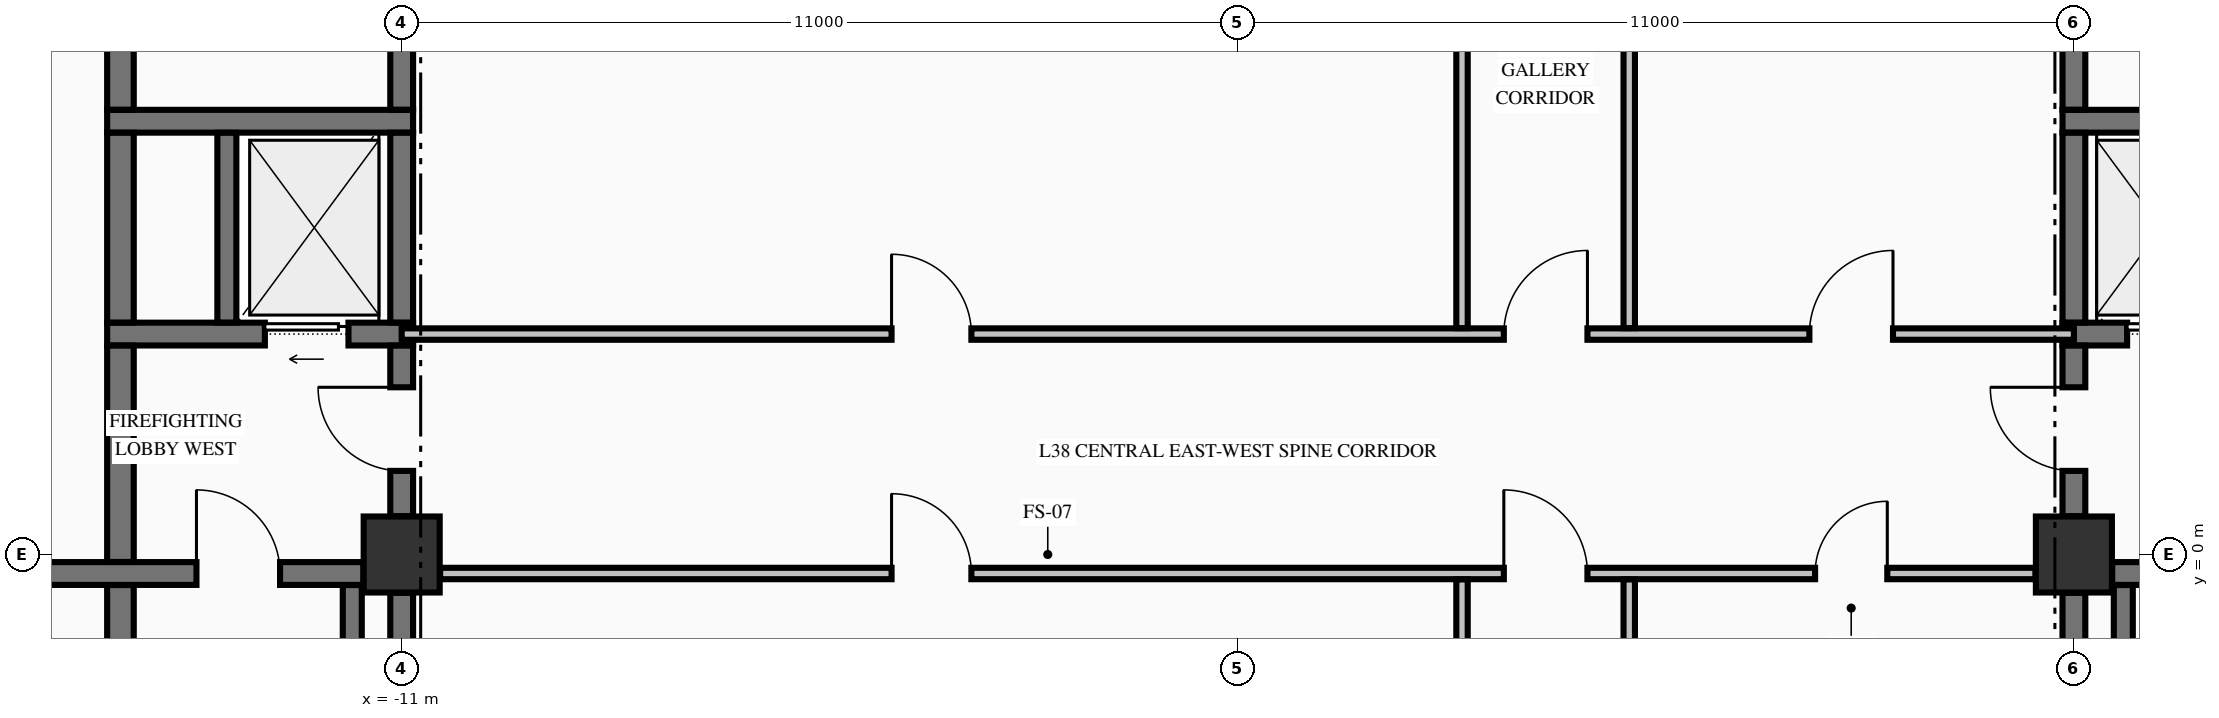
"""IFC4 building model, lengths in metres.
Left out: names, types, materials, properties, quantities, classifications, styles, units other than length and angle.
Written with IfcOpenShell. Run it as: python <this file> out.ifc"""

import sys

from ifc_helpers import new_model, si_unit, direction, frame, frame_2d, origin, origin_2d, place, context, subcontext, project, spatial, rectangle, extrude, element, fill, save


model = new_model("IFC4")
c1 = context("Model", 3, precision=1e-05, world=origin(), true_north=direction((0.0, 1.0)))
c2 = subcontext(c1, "Body", "Model", "MODEL_VIEW")
j1 = project(units=[si_unit("LENGTHUNIT", "METRE"), si_unit("PLANEANGLEUNIT", "RADIAN")], contexts=[c1])
p1 = place(None, origin())
s1 = spatial("IfcSite", under=j1, at=p1, CompositionType="ELEMENT")
p2 = place(p1, origin())
s2 = spatial("IfcBuilding", under=s1, at=p2, CompositionType="ELEMENT")
p3 = place(p2, frame((0.0, 0.0, 149.91)))
s3 = spatial("IfcBuildingStorey", under=s2, at=p3, CompositionType="ELEMENT", Elevation=149.91)
for number, where, z_axis, x_axis in (
    (1, (-11.0, 0.0, -0.25), (0.0, 0.0, 1.0), (1.0, 0.0, 0.0)),
    (2, (11.0, 0.0, -0.25), (0.0, 0.0, 1.0), (1.0, 0.0, 0.0)),
):
    element("IfcColumn", number, at=place(p3, frame(where, z_axis=z_axis, x_axis=x_axis)), inside=s3, PredefinedType="COLUMN", context=c2, shape_type="SweptSolid", body=[
        extrude(rectangle(XDim=1.0, YDim=1.0, at=origin_2d()), origin(), (0.0, 0.0, 1.0), 3.395),
    ])
p4 = place(p3, frame((-19.496, -0.25, 0.0), z_axis=(0.0, 0.0, 1.0), x_axis=(1.0, 0.0, 0.0)))
e3 = element("IfcWall", 3, at=p4, inside=s3, PredefinedType="SHEAR", context=c2, shape_type="SweptSolid", body=[
    extrude(rectangle(XDim=7.992, YDim=0.3, at=frame_2d((3.996, 0.0))), origin(), (0.0, 0.0, 1.0), 3.145),
])
p5 = place(p4, frame((5.796, 0.0, 0.0)))
e4 = element("IfcOpeningElement", 4, at=p5, cuts=e3, PredefinedType="OPENING", context=c2, shape_type="SweptSolid", body=[
    extrude(rectangle(XDim=1.1, YDim=2.15, at=frame_2d((0.55, 1.075))), frame((0.0, 0.16, 0.0), z_axis=(0.0, -1.0, 0.0), x_axis=(1.0, 0.0, 0.0)), (0.0, 0.0, 1.0), 0.32),
])
p6 = place(p3, frame((11.504, -0.25, 0.0), z_axis=(0.0, 0.0, 1.0), x_axis=(1.0, 0.0, 0.0)))
e5 = element("IfcWall", 5, at=p6, inside=s3, PredefinedType="SHEAR", context=c2, shape_type="SweptSolid", body=[
    extrude(rectangle(XDim=3.371, YDim=0.3, at=frame_2d((1.686, 0.0))), origin(), (0.0, 0.0, 1.0), 3.145),
])
p7 = place(p6, frame((1.096, 0.0, 0.0)))
e6 = element("IfcOpeningElement", 6, at=p7, cuts=e5, PredefinedType="OPENING", context=c2, shape_type="SweptSolid", body=[
    extrude(rectangle(XDim=1.1, YDim=2.15, at=frame_2d((0.55, 1.075))), frame((0.0, 0.16, 0.0), z_axis=(0.0, -1.0, 0.0), x_axis=(1.0, 0.0, 0.0)), (0.0, 0.0, 1.0), 0.32),
])
p8 = place(p3, frame((-14.875, 2.9, 0.0), z_axis=(0.0, 0.0, 1.0), x_axis=(1.0, 0.0, 0.0)))
e7 = element("IfcWall", 7, at=p8, inside=s3, PredefinedType="SHEAR", context=c2, shape_type="SweptSolid", body=[
    extrude(rectangle(XDim=4.025, YDim=0.3, at=frame_2d((2.012, 0.0))), origin(), (0.0, 0.0, 1.0), 3.145),
])
p9 = place(p8, frame((2.075, 0.0, 0.0)))
e8 = element("IfcOpeningElement", 8, at=p9, cuts=e7, PredefinedType="OPENING", context=c2, shape_type="SweptSolid", body=[
    extrude(rectangle(XDim=1.1, YDim=2.2, at=frame_2d((0.55, 1.1))), frame((0.0, 0.16, 0.0), z_axis=(0.0, -1.0, 0.0), x_axis=(1.0, 0.0, 0.0)), (0.0, 0.0, 1.0), 0.32),
])
p10 = place(p3, frame((10.85, 2.9, 0.0), z_axis=(0.0, 0.0, 1.0), x_axis=(1.0, 0.0, 0.0)))
e9 = element("IfcWall", 9, at=p10, inside=s3, PredefinedType="SHEAR", context=c2, shape_type="SweptSolid", body=[
    extrude(rectangle(XDim=4.025, YDim=0.3, at=frame_2d((2.012, 0.0))), origin(), (0.0, 0.0, 1.0), 3.145),
])
p11 = place(p10, frame((0.85, 0.0, 0.0)))
e10 = element("IfcOpeningElement", 10, at=p11, cuts=e9, PredefinedType="OPENING", context=c2, shape_type="SweptSolid", body=[
    extrude(rectangle(XDim=1.1, YDim=2.2, at=frame_2d((0.55, 1.1))), frame((0.0, 0.16, 0.0), z_axis=(0.0, -1.0, 0.0), x_axis=(1.0, 0.0, 0.0)), (0.0, 0.0, 1.0), 0.32),
])
for number, where, z_axis, x_axis in (
    (11, (-14.875, 5.7, 0.0), (0.0, 0.0, 1.0), (1.0, 0.0, 0.0)),
    (12, (10.85, 5.7, 0.0), (0.0, 0.0, 1.0), (1.0, 0.0, 0.0)),
):
    element("IfcWall", number, at=place(p3, frame(where, z_axis=z_axis, x_axis=x_axis)), inside=s3, PredefinedType="SHEAR", context=c2, shape_type="SweptSolid", body=[
        extrude(rectangle(XDim=4.025, YDim=0.3, at=frame_2d((2.012, 0.0))), origin(), (0.0, 0.0, 1.0), 3.145),
    ])
p12 = place(p3, frame((-10.494, -0.25, 0.0), z_axis=(0.0, 0.0, 1.0), x_axis=(1.0, 0.0, 0.0)))
e13 = element("IfcWall", 13, at=p12, inside=s3, PredefinedType="PARTITIONING", context=c2, shape_type="SweptSolid", body=[
    extrude(rectangle(XDim=20.988, YDim=0.15, at=frame_2d((10.494, 0.0))), origin(), (0.0, 0.0, 1.0), 3.145),
])
p13 = place(p12, frame((13.994, 0.0, 0.0)))
e14 = element("IfcOpeningElement", 14, at=p13, cuts=e13, PredefinedType="OPENING", context=c2, shape_type="SweptSolid", body=[
    extrude(rectangle(XDim=1.1, YDim=2.15, at=frame_2d((0.55, 1.075))), frame((0.0, 0.085, 0.0), z_axis=(0.0, -1.0, 0.0), x_axis=(1.0, 0.0, 0.0)), (0.0, 0.0, 1.0), 0.17),
])
p14 = place(p12, frame((5.939, 0.0, 0.0)))
e15 = element("IfcOpeningElement", 15, at=p14, cuts=e13, PredefinedType="OPENING", context=c2, shape_type="SweptSolid", body=[
    extrude(rectangle(XDim=1.05, YDim=2.15, at=frame_2d((0.525, 1.075))), frame((0.0, 0.085, 0.0), z_axis=(0.0, -1.0, 0.0), x_axis=(1.0, 0.0, 0.0)), (0.0, 0.0, 1.0), 0.17),
])
p15 = place(p12, frame((18.089, 0.0, 0.0)))
e16 = element("IfcOpeningElement", 16, at=p15, cuts=e13, PredefinedType="OPENING", context=c2, shape_type="SweptSolid", body=[
    extrude(rectangle(XDim=0.95, YDim=2.15, at=frame_2d((0.475, 1.075))), frame((0.0, 0.085, 0.0), z_axis=(0.0, -1.0, 0.0), x_axis=(1.0, 0.0, 0.0)), (0.0, 0.0, 1.0), 0.17),
])
p16 = place(p3, frame((-11.0, 2.9, 0.0), z_axis=(0.0, 0.0, 1.0), x_axis=(1.0, 0.0, 0.0)))
e17 = element("IfcWall", 17, at=p16, inside=s3, PredefinedType="PARTITIONING", context=c2, shape_type="SweptSolid", body=[
    extrude(rectangle(XDim=22.0, YDim=0.15, at=frame_2d((11.0, 0.0))), origin(), (0.0, 0.0, 1.0), 3.145),
])
p17 = place(p16, frame((14.5, 0.0, 0.0)))
e18 = element("IfcOpeningElement", 18, at=p17, cuts=e17, PredefinedType="OPENING", context=c2, shape_type="SweptSolid", body=[
    extrude(rectangle(XDim=1.1, YDim=2.15, at=frame_2d((0.55, 1.075))), frame((0.0, 0.085, 0.0), z_axis=(0.0, -1.0, 0.0), x_axis=(1.0, 0.0, 0.0)), (0.0, 0.0, 1.0), 0.17),
])
p18 = place(p16, frame((6.445, 0.0, 0.0)))
e19 = element("IfcOpeningElement", 19, at=p18, cuts=e17, PredefinedType="OPENING", context=c2, shape_type="SweptSolid", body=[
    extrude(rectangle(XDim=1.05, YDim=2.15, at=frame_2d((0.525, 1.075))), frame((0.0, 0.085, 0.0), z_axis=(0.0, -1.0, 0.0), x_axis=(1.0, 0.0, 0.0)), (0.0, 0.0, 1.0), 0.17),
])
p19 = place(p16, frame((18.52, 0.0, 0.0)))
e20 = element("IfcOpeningElement", 20, at=p19, cuts=e17, PredefinedType="OPENING", context=c2, shape_type="SweptSolid", body=[
    extrude(rectangle(XDim=1.1, YDim=2.15, at=frame_2d((0.55, 1.075))), frame((0.0, 0.085, 0.0), z_axis=(0.0, -1.0, 0.0), x_axis=(1.0, 0.0, 0.0)), (0.0, 0.0, 1.0), 0.17),
])
p20 = place(p3, frame((-14.7, -9.773, 0.0), z_axis=(0.0, 0.0, 1.0), x_axis=(0.0, 1.0, 0.0)))
e21 = element("IfcWall", 21, at=p20, inside=s3, PredefinedType="SHEAR", context=c2, shape_type="SweptSolid", body=[
    extrude(rectangle(XDim=9.371, YDim=0.35, at=frame_2d((4.686, 0.0))), origin(), (0.0, 0.0, 1.0), 3.145),
])
p21 = place(p3, frame((-14.7, -0.098, 0.0), z_axis=(0.0, 0.0, 1.0), x_axis=(0.0, 1.0, 0.0)))
e22 = element("IfcWall", 22, at=p21, inside=s3, PredefinedType="SHEAR", context=c2, shape_type="SweptSolid", body=[
    extrude(rectangle(XDim=2.846, YDim=0.35, at=frame_2d((1.423, 0.0))), origin(), (0.0, 0.0, 1.0), 3.145),
])
p22 = place(p3, frame((-14.7, 3.052, 0.0), z_axis=(0.0, 0.0, 1.0), x_axis=(0.0, 1.0, 0.0)))
e23 = element("IfcWall", 23, at=p22, inside=s3, PredefinedType="SHEAR", context=c2, shape_type="SweptSolid", body=[
    extrude(rectangle(XDim=2.496, YDim=0.35, at=frame_2d((1.248, 0.0))), origin(), (0.0, 0.0, 1.0), 3.145),
])
p23 = place(p3, frame((-14.7, 5.852, 0.0), z_axis=(0.0, 0.0, 1.0), x_axis=(0.0, 1.0, 0.0)))
e24 = element("IfcWall", 24, at=p23, inside=s3, PredefinedType="SHEAR", context=c2, shape_type="SweptSolid", body=[
    extrude(rectangle(XDim=4.471, YDim=0.35, at=frame_2d((2.235, 0.0))), origin(), (0.0, 0.0, 1.0), 3.145),
])
p24 = place(p3, frame((-13.3, 3.052, 0.0), z_axis=(0.0, 0.0, 1.0), x_axis=(0.0, 1.0, 0.0)))
e25 = element("IfcWall", 25, at=p24, inside=s3, PredefinedType="SOLIDWALL", context=c2, shape_type="SweptSolid", body=[
    extrude(rectangle(XDim=2.496, YDim=0.25, at=frame_2d((1.248, 0.0))), origin(), (0.0, 0.0, 1.0), 3.145),
])
p25 = place(p3, frame((-11.65, -9.798, 0.0), z_axis=(0.0, 0.0, 1.0), x_axis=(0.0, 1.0, 0.0)))
e26 = element("IfcWall", 26, at=p25, inside=s3, PredefinedType="SOLIDWALL", context=c2, shape_type="SweptSolid", body=[
    extrude(rectangle(XDim=9.396, YDim=0.25, at=frame_2d((4.698, 0.0))), origin(), (0.0, 0.0, 1.0), 3.145),
])
p26 = place(p3, frame((-11.0, -9.446, 0.0), z_axis=(0.0, 0.0, 1.0), x_axis=(0.0, 1.0, 0.0)))
e27 = element("IfcWall", 27, at=p26, inside=s3, PredefinedType="SHEAR", context=c2, shape_type="SweptSolid", body=[
    extrude(rectangle(XDim=8.942, YDim=0.3, at=frame_2d((4.471, 0.0))), origin(), (0.0, 0.0, 1.0), 3.145),
])
p27 = place(p3, frame((-11.0, 0.504, 0.0), z_axis=(0.0, 0.0, 1.0), x_axis=(0.0, 1.0, 0.0)))
e28 = element("IfcWall", 28, at=p27, inside=s3, PredefinedType="SHEAR", context=c2, shape_type="SweptSolid", body=[
    extrude(rectangle(XDim=2.244, YDim=0.3, at=frame_2d((1.122, 0.0))), origin(), (0.0, 0.0, 1.0), 3.145),
])
p28 = place(p27, frame((0.596, 0.0, 0.0)))
e29 = element("IfcOpeningElement", 29, at=p28, cuts=e28, PredefinedType="OPENING", context=c2, shape_type="SweptSolid", body=[
    extrude(rectangle(XDim=1.1, YDim=2.15, at=frame_2d((0.55, 1.075))), frame((0.0, 0.16, 0.0), z_axis=(0.0, -1.0, 0.0), x_axis=(1.0, 0.0, 0.0)), (0.0, 0.0, 1.0), 0.32),
])
p29 = place(p3, frame((-11.0, 3.052, 0.0), z_axis=(0.0, 0.0, 1.0), x_axis=(0.0, 1.0, 0.0)))
e30 = element("IfcWall", 30, at=p29, inside=s3, PredefinedType="SHEAR", context=c2, shape_type="SweptSolid", body=[
    extrude(rectangle(XDim=2.496, YDim=0.3, at=frame_2d((1.248, 0.0))), origin(), (0.0, 0.0, 1.0), 3.145),
])
p30 = place(p3, frame((-11.0, 5.852, 0.0), z_axis=(0.0, 0.0, 1.0), x_axis=(0.0, 1.0, 0.0)))
e31 = element("IfcWall", 31, at=p30, inside=s3, PredefinedType="SHEAR", context=c2, shape_type="SweptSolid", body=[
    extrude(rectangle(XDim=4.144, YDim=0.3, at=frame_2d((2.072, 0.0))), origin(), (0.0, 0.0, 1.0), 3.145),
])
p31 = place(p3, frame((11.0, -9.446, 0.0), z_axis=(0.0, 0.0, 1.0), x_axis=(0.0, 1.0, 0.0)))
e32 = element("IfcWall", 32, at=p31, inside=s3, PredefinedType="SHEAR", context=c2, shape_type="SweptSolid", body=[
    extrude(rectangle(XDim=8.942, YDim=0.3, at=frame_2d((4.471, 0.0))), origin(), (0.0, 0.0, 1.0), 3.145),
])
p32 = place(p3, frame((11.0, 0.504, 0.0), z_axis=(0.0, 0.0, 1.0), x_axis=(0.0, 1.0, 0.0)))
e33 = element("IfcWall", 33, at=p32, inside=s3, PredefinedType="SHEAR", context=c2, shape_type="SweptSolid", body=[
    extrude(rectangle(XDim=2.244, YDim=0.3, at=frame_2d((1.122, 0.0))), origin(), (0.0, 0.0, 1.0), 3.145),
])
p33 = place(p32, frame((0.596, 0.0, 0.0)))
e34 = element("IfcOpeningElement", 34, at=p33, cuts=e33, PredefinedType="OPENING", context=c2, shape_type="SweptSolid", body=[
    extrude(rectangle(XDim=1.1, YDim=2.15, at=frame_2d((0.55, 1.075))), frame((0.0, 0.16, 0.0), z_axis=(0.0, -1.0, 0.0), x_axis=(1.0, 0.0, 0.0)), (0.0, 0.0, 1.0), 0.32),
])
p34 = place(p3, frame((11.0, 3.052, 0.0), z_axis=(0.0, 0.0, 1.0), x_axis=(0.0, 1.0, 0.0)))
e35 = element("IfcWall", 35, at=p34, inside=s3, PredefinedType="SHEAR", context=c2, shape_type="SweptSolid", body=[
    extrude(rectangle(XDim=2.496, YDim=0.3, at=frame_2d((1.248, 0.0))), origin(), (0.0, 0.0, 1.0), 3.145),
])
p35 = place(p3, frame((11.0, 5.852, 0.0), z_axis=(0.0, 0.0, 1.0), x_axis=(0.0, 1.0, 0.0)))
e36 = element("IfcWall", 36, at=p35, inside=s3, PredefinedType="SHEAR", context=c2, shape_type="SweptSolid", body=[
    extrude(rectangle(XDim=4.144, YDim=0.3, at=frame_2d((2.072, 0.0))), origin(), (0.0, 0.0, 1.0), 3.145),
])
p36 = place(p3, frame((11.65, -9.798, 0.0), z_axis=(0.0, 0.0, 1.0), x_axis=(0.0, 1.0, 0.0)))
e37 = element("IfcWall", 37, at=p36, inside=s3, PredefinedType="SOLIDWALL", context=c2, shape_type="SweptSolid", body=[
    extrude(rectangle(XDim=9.396, YDim=0.25, at=frame_2d((4.698, 0.0))), origin(), (0.0, 0.0, 1.0), 3.145),
])
p37 = place(p3, frame((2.95, -9.872, 0.0), z_axis=(0.0, 0.0, 1.0), x_axis=(0.0, 1.0, 0.0)))
e38 = element("IfcWall", 38, at=p37, inside=s3, PredefinedType="PARTITIONING", context=c2, shape_type="SweptSolid", body=[
    extrude(rectangle(XDim=9.544, YDim=0.15, at=frame_2d((4.772, 0.0))), origin(), (0.0, 0.0, 1.0), 3.145),
])
p38 = place(p3, frame((2.95, 2.978, 0.0), z_axis=(0.0, 0.0, 1.0), x_axis=(0.0, 1.0, 0.0)))
e39 = element("IfcWall", 39, at=p38, inside=s3, PredefinedType="PARTITIONING", context=c2, shape_type="SweptSolid", body=[
    extrude(rectangle(XDim=7.444, YDim=0.15, at=frame_2d((3.722, 0.0))), origin(), (0.0, 0.0, 1.0), 3.145),
])
p39 = place(p3, frame((5.15, -4.747, 0.0), z_axis=(0.0, 0.0, 1.0), x_axis=(0.0, 1.0, 0.0)))
e40 = element("IfcWall", 40, at=p39, inside=s3, PredefinedType="PARTITIONING", context=c2, shape_type="SweptSolid", body=[
    extrude(rectangle(XDim=4.419, YDim=0.15, at=frame_2d((2.209, 0.0))), origin(), (0.0, 0.0, 1.0), 3.145),
])
p40 = place(p3, frame((5.15, 2.978, 0.0), z_axis=(0.0, 0.0, 1.0), x_axis=(0.0, 1.0, 0.0)))
e41 = element("IfcWall", 41, at=p40, inside=s3, PredefinedType="PARTITIONING", context=c2, shape_type="SweptSolid", body=[
    extrude(rectangle(XDim=7.444, YDim=0.15, at=frame_2d((3.722, 0.0))), origin(), (0.0, 0.0, 1.0), 3.145),
])
p41 = place(p5, origin())
e42 = element("IfcDoor", 42, at=p41, inside=s3, OperationType="SINGLE_SWING_LEFT", PredefinedType="DOOR", context=c2, shape_type="SweptSolid", body=[
    extrude(rectangle(XDim=1.1, YDim=2.15, at=frame_2d((0.55, 1.075))), frame((0.0, 0.025, 0.0), z_axis=(0.0, -1.0, 0.0), x_axis=(1.0, 0.0, 0.0)), (0.0, 0.0, 1.0), 0.05),
])
fill(e4, e42)
p42 = place(p28, origin())
e43 = element("IfcDoor", 43, at=p42, inside=s3, OperationType="SINGLE_SWING_RIGHT", PredefinedType="DOOR", context=c2, shape_type="SweptSolid", body=[
    extrude(rectangle(XDim=1.1, YDim=2.15, at=frame_2d((0.55, 1.075))), frame((0.0, 0.025, 0.0), z_axis=(0.0, -1.0, 0.0), x_axis=(1.0, 0.0, 0.0)), (0.0, 0.0, 1.0), 0.05),
])
fill(e29, e43)
p43 = place(p9, origin())
e44 = element("IfcDoor", 44, at=p43, inside=s3, OperationType="SLIDING_TO_LEFT", PredefinedType="DOOR", context=c2, shape_type="SweptSolid", body=[
    extrude(rectangle(XDim=1.1, YDim=2.2, at=frame_2d((0.55, 1.1))), frame((0.0, 0.025, 0.0), z_axis=(0.0, -1.0, 0.0), x_axis=(1.0, 0.0, 0.0)), (0.0, 0.0, 1.0), 0.05),
])
fill(e8, e44)
p44 = place(p33, origin())
e45 = element("IfcDoor", 45, at=p44, inside=s3, OperationType="SINGLE_SWING_RIGHT", PredefinedType="DOOR", context=c2, shape_type="SweptSolid", body=[
    extrude(rectangle(XDim=1.1, YDim=2.15, at=frame_2d((0.55, 1.075))), frame((0.0, 0.025, 0.0), z_axis=(0.0, -1.0, 0.0), x_axis=(1.0, 0.0, 0.0)), (0.0, 0.0, 1.0), 0.05),
])
fill(e34, e45)
p45 = place(p11, origin())
e46 = element("IfcDoor", 46, at=p45, inside=s3, OperationType="SLIDING_TO_RIGHT", PredefinedType="DOOR", context=c2, shape_type="SweptSolid", body=[
    extrude(rectangle(XDim=1.1, YDim=2.2, at=frame_2d((0.55, 1.1))), frame((0.0, 0.025, 0.0), z_axis=(0.0, -1.0, 0.0), x_axis=(1.0, 0.0, 0.0)), (0.0, 0.0, 1.0), 0.05),
])
fill(e10, e46)
p46 = place(p17, origin())
e47 = element("IfcDoor", 47, at=p46, inside=s3, OperationType="SINGLE_SWING_RIGHT", PredefinedType="DOOR", context=c2, shape_type="SweptSolid", body=[
    extrude(rectangle(XDim=1.1, YDim=2.15, at=frame_2d((0.55, 1.075))), frame((0.0, 0.025, 0.0), z_axis=(0.0, -1.0, 0.0), x_axis=(1.0, 0.0, 0.0)), (0.0, 0.0, 1.0), 0.05),
])
fill(e18, e47)
p47 = place(p13, origin())
e48 = element("IfcDoor", 48, at=p47, inside=s3, OperationType="SINGLE_SWING_LEFT", PredefinedType="DOOR", context=c2, shape_type="SweptSolid", body=[
    extrude(rectangle(XDim=1.1, YDim=2.15, at=frame_2d((0.55, 1.075))), frame((0.0, 0.025, 0.0), z_axis=(0.0, -1.0, 0.0), x_axis=(1.0, 0.0, 0.0)), (0.0, 0.0, 1.0), 0.05),
])
fill(e14, e48)
p48 = place(p18, origin())
e49 = element("IfcDoor", 49, at=p48, inside=s3, OperationType="SINGLE_SWING_LEFT", PredefinedType="DOOR", context=c2, shape_type="SweptSolid", body=[
    extrude(rectangle(XDim=1.05, YDim=2.15, at=frame_2d((0.525, 1.075))), frame((0.0, 0.025, 0.0), z_axis=(0.0, -1.0, 0.0), x_axis=(1.0, 0.0, 0.0)), (0.0, 0.0, 1.0), 0.05),
])
fill(e19, e49)
p49 = place(p19, origin())
e50 = element("IfcDoor", 50, at=p49, inside=s3, OperationType="SINGLE_SWING_RIGHT", PredefinedType="DOOR", context=c2, shape_type="SweptSolid", body=[
    extrude(rectangle(XDim=1.1, YDim=2.15, at=frame_2d((0.55, 1.075))), frame((0.0, 0.025, 0.0), z_axis=(0.0, -1.0, 0.0), x_axis=(1.0, 0.0, 0.0)), (0.0, 0.0, 1.0), 0.05),
])
fill(e20, e50)
p50 = place(p14, origin())
e51 = element("IfcDoor", 51, at=p50, inside=s3, OperationType="SINGLE_SWING_LEFT", PredefinedType="DOOR", context=c2, shape_type="SweptSolid", body=[
    extrude(rectangle(XDim=1.05, YDim=2.15, at=frame_2d((0.525, 1.075))), frame((0.0, 0.025, 0.0), z_axis=(0.0, -1.0, 0.0), x_axis=(1.0, 0.0, 0.0)), (0.0, 0.0, 1.0), 0.05),
])
fill(e15, e51)
p51 = place(p15, origin())
e52 = element("IfcDoor", 52, at=p51, inside=s3, OperationType="SINGLE_SWING_RIGHT", PredefinedType="DOOR", context=c2, shape_type="SweptSolid", body=[
    extrude(rectangle(XDim=0.95, YDim=2.15, at=frame_2d((0.475, 1.075))), frame((0.0, 0.025, 0.0), z_axis=(0.0, -1.0, 0.0), x_axis=(1.0, 0.0, 0.0)), (0.0, 0.0, 1.0), 0.05),
])
fill(e16, e52)
save(model, sys.argv[1])
